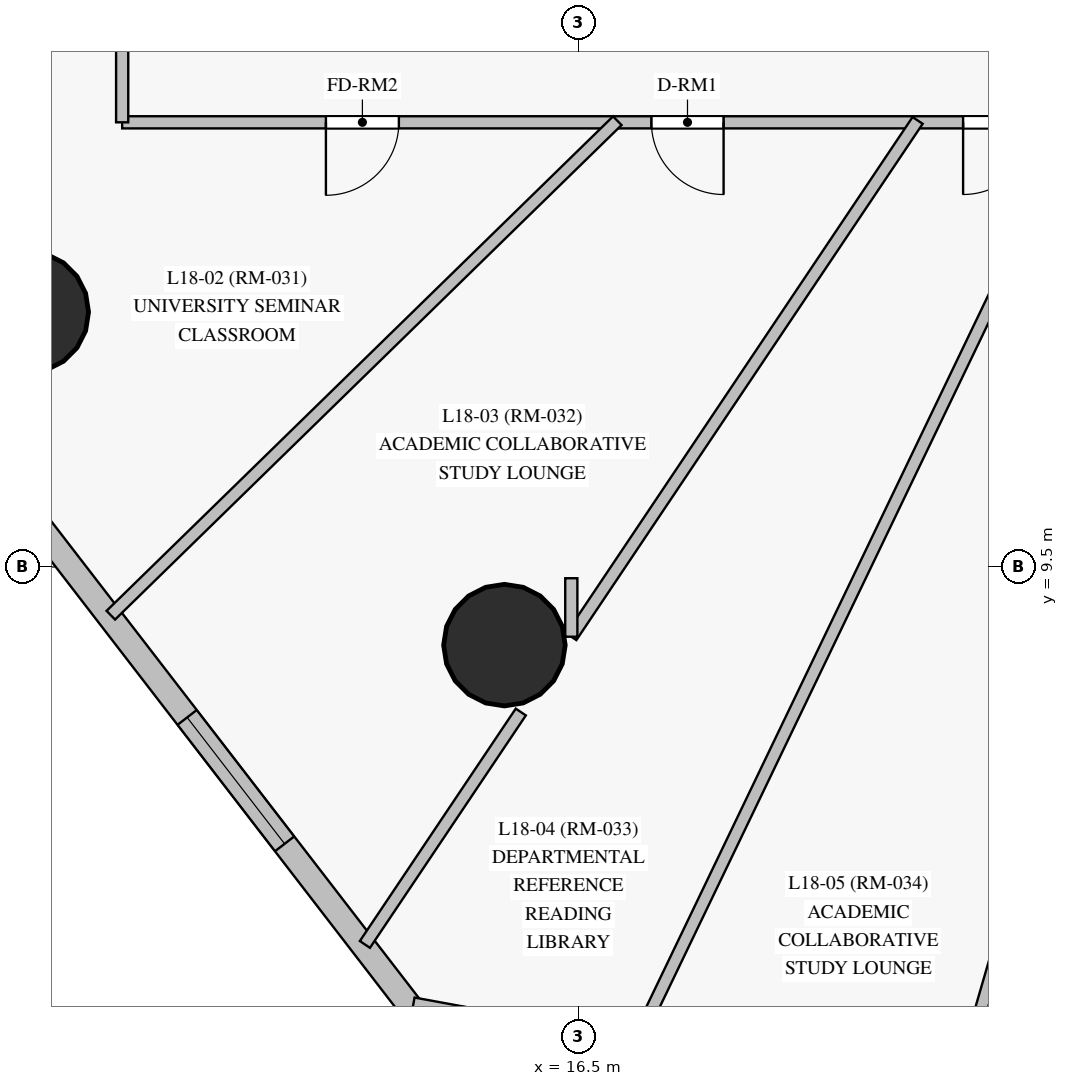
"""IFC4 building model, lengths in metres.
Left out: names, types, materials, properties, quantities, classifications, styles, units other than length and angle.
Written with IfcOpenShell. Run it as: python <this file> out.ifc"""

import sys

from ifc_helpers import new_model, si_unit, direction, frame, frame_2d, origin, origin_with_axes, origin_2d, place, context, subcontext, project, spatial, rectangle, circle, extrude, source, transform, mapped, element, fill, save


model = new_model("IFC4")
c1 = context("Model", 3, precision=1e-05, world=origin(), true_north=direction((0.0, 1.0)))
c2 = subcontext(c1, "Body", "Model", "MODEL_VIEW")
j1 = project(units=[si_unit("LENGTHUNIT", "METRE"), si_unit("PLANEANGLEUNIT", "RADIAN")], contexts=[c1])
p1 = place(None, origin())
s1 = spatial("IfcSite", under=j1, at=p1, CompositionType="ELEMENT")
p2 = place(p1, origin())
s2 = spatial("IfcBuilding", under=s1, at=p2, CompositionType="ELEMENT")
p3 = place(p2, frame((0.0, 0.0, 69.7)))
s3 = spatial("IfcBuildingStorey", under=s2, at=p3, CompositionType="ELEMENT", Elevation=69.7)
m1 = source(origin_with_axes(), c2, "Body", "SweptSolid", [
    extrude(circle(Radius=0.8, at=origin_2d()), origin(), (0.0, 0.0, 1.0), 3.6),
])
for number, where, z_axis, x_axis in (
    (1, (9.258, 12.854, 0.0), (0.0, 0.0, 1.0), (1.0, 0.0, 0.0)),
    (2, (15.529, 8.472, 0.0), (0.0, 0.0, 1.0), (1.0, 0.0, 0.0)),
):
    element("IfcColumn", number, at=place(p3, frame(where, z_axis=z_axis, x_axis=x_axis)), inside=s3, PredefinedType="COLUMN", context=c2, shape_type="MappedRepresentation", body=[
        mapped(m1, transform((0.0, 0.0, 0.0), scale=1.0)),
    ])
p4 = place(p3, frame((6.609, 13.677, 0.0), z_axis=(0.0, 0.0, 1.0), x_axis=(0.610596304002, -0.791942014001, 0.0)))
e3 = element("IfcWall", 3, at=p4, inside=s3, PredefinedType="SOLIDWALL", context=c2, shape_type="SweptSolid", body=[
    extrude(rectangle(XDim=12.625, YDim=0.32, at=frame_2d((6.312, 0.0))), origin(), (0.0, 0.0, 1.0), 3.35),
])
p5 = place(p4, frame((2.025, 0.0, 0.85)))
e4 = element("IfcOpeningElement", 4, at=p5, cuts=e3, PredefinedType="OPENING", context=c2, shape_type="SweptSolid", body=[
    extrude(rectangle(XDim=2.1, YDim=1.95, at=frame_2d((1.05, 0.975))), frame((0.0, 0.17, 0.0), z_axis=(0.0, -1.0, 0.0), x_axis=(1.0, 0.0, 0.0)), (0.0, 0.0, 1.0), 0.34),
])
p6 = place(p4, frame((7.773, 0.0, 0.85)))
e5 = element("IfcOpeningElement", 5, at=p6, cuts=e3, PredefinedType="OPENING", context=c2, shape_type="SweptSolid", body=[
    extrude(rectangle(XDim=2.1, YDim=1.95, at=frame_2d((1.05, 0.975))), frame((0.0, 0.17, 0.0), z_axis=(0.0, -1.0, 0.0), x_axis=(1.0, 0.0, 0.0)), (0.0, 0.0, 1.0), 0.34),
])
p7 = place(p3, frame((14.318, 3.678, 0.0), z_axis=(0.0, 0.0, 1.0), x_axis=(0.983594660339, -0.180392749723, 0.0)))
e6 = element("IfcWall", 6, at=p7, inside=s3, PredefinedType="SOLIDWALL", context=c2, shape_type="SweptSolid", body=[
    extrude(rectangle(XDim=10.133, YDim=0.32, at=frame_2d((5.066, 0.0))), origin(), (0.0, 0.0, 1.0), 3.35),
])
p8 = place(p7, frame((0.61, 0.0, 0.85)))
e7 = element("IfcOpeningElement", 7, at=p8, cuts=e6, PredefinedType="OPENING", context=c2, shape_type="SweptSolid", body=[
    extrude(rectangle(XDim=1.8, YDim=1.85, at=frame_2d((0.9, 0.925))), frame((0.0, 0.17, 0.0), z_axis=(0.0, -1.0, 0.0), x_axis=(1.0, 0.0, 0.0)), (0.0, 0.0, 1.0), 0.34),
])
p9 = place(p7, frame((4.044, 0.0, 0.85)))
e8 = element("IfcOpeningElement", 8, at=p9, cuts=e6, PredefinedType="OPENING", context=c2, shape_type="SweptSolid", body=[
    extrude(rectangle(XDim=2.1, YDim=1.95, at=frame_2d((1.05, 0.975))), frame((0.0, 0.17, 0.0), z_axis=(0.0, -1.0, 0.0), x_axis=(1.0, 0.0, 0.0)), (0.0, 0.0, 1.0), 0.34),
])
p10 = place(p3, frame((40.25, 15.35, 0.0), z_axis=(0.0, 0.0, 1.0), x_axis=(-1.0, 0.0, 0.0)))
e9 = element("IfcWall", 9, at=p10, inside=s3, PredefinedType="PARTITIONING", context=c2, shape_type="SweptSolid", body=[
    extrude(rectangle(XDim=29.75, YDim=0.16, at=frame_2d((14.875, 0.0))), origin(), (0.0, 0.0, 1.0), 2.7),
])
p11 = place(p10, frame((26.11, 0.0, 0.0)))
e10 = element("IfcOpeningElement", 10, at=p11, cuts=e9, PredefinedType="OPENING", context=c2, shape_type="SweptSolid", body=[
    extrude(rectangle(XDim=0.96, YDim=2.15, at=frame_2d((0.48, 1.075))), frame((0.0, 0.09, 0.0), z_axis=(0.0, -1.0, 0.0), x_axis=(1.0, 0.0, 0.0)), (0.0, 0.0, 1.0), 0.18),
])
p12 = place(p10, frame((21.837, 0.0, 0.0)))
e11 = element("IfcOpeningElement", 11, at=p12, cuts=e9, PredefinedType="OPENING", context=c2, shape_type="SweptSolid", body=[
    extrude(rectangle(XDim=0.95, YDim=2.15, at=frame_2d((0.475, 1.075))), frame((0.0, 0.09, 0.0), z_axis=(0.0, -1.0, 0.0), x_axis=(1.0, 0.0, 0.0)), (0.0, 0.0, 1.0), 0.18),
])
p13 = place(p10, frame((17.737, 0.0, 0.0)))
e12 = element("IfcOpeningElement", 12, at=p13, cuts=e9, PredefinedType="OPENING", context=c2, shape_type="SweptSolid", body=[
    extrude(rectangle(XDim=0.95, YDim=2.15, at=frame_2d((0.475, 1.075))), frame((0.0, 0.09, 0.0), z_axis=(0.0, -1.0, 0.0), x_axis=(1.0, 0.0, 0.0)), (0.0, 0.0, 1.0), 0.18),
])
p14 = place(p10, frame((15.604, 0.0, 0.0)))
e13 = element("IfcOpeningElement", 13, at=p14, cuts=e9, PredefinedType="OPENING", context=c2, shape_type="SweptSolid", body=[
    extrude(rectangle(XDim=0.95, YDim=2.15, at=frame_2d((0.475, 1.075))), frame((0.0, 0.09, 0.0), z_axis=(0.0, -1.0, 0.0), x_axis=(1.0, 0.0, 0.0)), (0.0, 0.0, 1.0), 0.18),
])
p15 = place(p10, frame((12.96, 0.0, 0.0)))
e14 = element("IfcOpeningElement", 14, at=p15, cuts=e9, PredefinedType="OPENING", context=c2, shape_type="SweptSolid", body=[
    extrude(rectangle(XDim=0.96, YDim=2.15, at=frame_2d((0.48, 1.075))), frame((0.0, 0.09, 0.0), z_axis=(0.0, -1.0, 0.0), x_axis=(1.0, 0.0, 0.0)), (0.0, 0.0, 1.0), 0.18),
])
p16 = place(p10, frame((11.281, 0.0, 0.0)))
e15 = element("IfcOpeningElement", 15, at=p16, cuts=e9, PredefinedType="OPENING", context=c2, shape_type="SweptSolid", body=[
    extrude(rectangle(XDim=0.95, YDim=2.15, at=frame_2d((0.475, 1.075))), frame((0.0, 0.09, 0.0), z_axis=(0.0, -1.0, 0.0), x_axis=(1.0, 0.0, 0.0)), (0.0, 0.0, 1.0), 0.18),
])
p17 = place(p10, frame((9.601, 0.0, 0.0)))
e16 = element("IfcOpeningElement", 16, at=p17, cuts=e9, PredefinedType="OPENING", context=c2, shape_type="SweptSolid", body=[
    extrude(rectangle(XDim=0.96, YDim=2.15, at=frame_2d((0.48, 1.075))), frame((0.0, 0.09, 0.0), z_axis=(0.0, -1.0, 0.0), x_axis=(1.0, 0.0, 0.0)), (0.0, 0.0, 1.0), 0.18),
])
p18 = place(p10, frame((8.498, 0.0, 0.0)))
e17 = element("IfcOpeningElement", 17, at=p18, cuts=e9, PredefinedType="OPENING", context=c2, shape_type="SweptSolid", body=[
    extrude(rectangle(XDim=0.95, YDim=2.15, at=frame_2d((0.475, 1.075))), frame((0.0, 0.09, 0.0), z_axis=(0.0, -1.0, 0.0), x_axis=(1.0, 0.0, 0.0)), (0.0, 0.0, 1.0), 0.18),
])
p19 = place(p10, frame((2.579, 0.0, 0.0)))
e18 = element("IfcOpeningElement", 18, at=p19, cuts=e9, PredefinedType="OPENING", context=c2, shape_type="SweptSolid", body=[
    extrude(rectangle(XDim=0.95, YDim=2.15, at=frame_2d((0.475, 1.075))), frame((0.0, 0.09, 0.0), z_axis=(0.0, -1.0, 0.0), x_axis=(1.0, 0.0, 0.0)), (0.0, 0.0, 1.0), 0.18),
])
p20 = place(p3, frame((10.5, 15.35, 0.0), z_axis=(0.0, 0.0, 1.0), x_axis=(0.0, 1.0, 0.0)))
e19 = element("IfcWall", 19, at=p20, inside=s3, PredefinedType="PARTITIONING", context=c2, shape_type="SweptSolid", body=[
    extrude(rectangle(XDim=22.3, YDim=0.16, at=frame_2d((11.15, 0.0))), origin(), (0.0, 0.0, 1.0), 2.75),
])
p21 = place(p20, frame((7.33, 0.0, 0.0)))
e20 = element("IfcOpeningElement", 20, at=p21, cuts=e19, PredefinedType="OPENING", context=c2, shape_type="SweptSolid", body=[
    extrude(rectangle(XDim=0.95, YDim=2.15, at=frame_2d((0.475, 1.075))), frame((0.0, 0.09, 0.0), z_axis=(0.0, -1.0, 0.0), x_axis=(1.0, 0.0, 0.0)), (0.0, 0.0, 1.0), 0.18),
])
p22 = place(p20, frame((16.25, 0.0, 0.0)))
e21 = element("IfcOpeningElement", 21, at=p22, cuts=e19, PredefinedType="OPENING", context=c2, shape_type="SweptSolid", body=[
    extrude(rectangle(XDim=0.96, YDim=2.15, at=frame_2d((0.48, 1.075))), frame((0.0, 0.09, 0.0), z_axis=(0.0, -1.0, 0.0), x_axis=(1.0, 0.0, 0.0)), (0.0, 0.0, 1.0), 0.18),
])
p23 = place(p20, frame((10.675, 0.0, 0.0)))
e22 = element("IfcOpeningElement", 22, at=p23, cuts=e19, PredefinedType="OPENING", context=c2, shape_type="SweptSolid", body=[
    extrude(rectangle(XDim=0.95, YDim=2.15, at=frame_2d((0.475, 1.075))), frame((0.0, 0.09, 0.0), z_axis=(0.0, -1.0, 0.0), x_axis=(1.0, 0.0, 0.0)), (0.0, 0.0, 1.0), 0.18),
])
p24 = place(p3, frame((23.096, 15.39, 0.0), z_axis=(0.0, 0.0, 1.0), x_axis=(-0.433095236194, -0.901348166019, 0.0)))
e23 = element("IfcWall", 23, at=p24, inside=s3, PredefinedType="PARTITIONING", context=c2, shape_type="SweptSolid", body=[
    extrude(rectangle(XDim=13.555, YDim=0.16, at=frame_2d((6.777, 0.0))), origin(), (0.0, 0.0, 1.0), 3.35),
])
p25 = place(p3, frame((25.203, 15.379, 0.0), z_axis=(0.0, 0.0, 1.0), x_axis=(-0.279252938463, -0.960217577615, 0.0)))
e24 = element("IfcWall", 24, at=p25, inside=s3, PredefinedType="PARTITIONING", context=c2, shape_type="SweptSolid", body=[
    extrude(rectangle(XDim=13.517, YDim=0.16, at=frame_2d((6.759, 0.0))), origin(), (0.0, 0.0, 1.0), 3.35),
])
p26 = place(p3, frame((17.014, 15.371, 0.0), z_axis=(0.0, 0.0, 1.0), x_axis=(-0.715549557625, -0.69856197333, 0.0)))
e25 = element("IfcWall", 25, at=p26, inside=s3, PredefinedType="PARTITIONING", context=c2, shape_type="SweptSolid", body=[
    extrude(rectangle(XDim=9.313, YDim=0.16, at=frame_2d((4.656, 0.0))), origin(), (0.0, 0.0, 1.0), 3.35),
])
p27 = place(p3, frame((20.965, 15.375, 0.0), z_axis=(0.0, 0.0, 1.0), x_axis=(-0.557067606791, -0.830467146529, 0.0)))
e26 = element("IfcWall", 26, at=p27, inside=s3, PredefinedType="PARTITIONING", context=c2, shape_type="SweptSolid", body=[
    extrude(rectangle(XDim=8.179, YDim=0.16, at=frame_2d((4.089, 0.0))), origin(), (0.0, 0.0, 1.0), 3.35),
])
p28 = place(p3, frame((10.54, 17.587, 0.0), z_axis=(0.0, 0.0, 1.0), x_axis=(-0.894427191, -0.4472135955, 0.0)))
e27 = element("IfcWall", 27, at=p28, inside=s3, PredefinedType="PARTITIONING", context=c2, shape_type="SweptSolid", body=[
    extrude(rectangle(XDim=4.659, YDim=0.16, at=frame_2d((2.33, 0.0))), origin(), (0.0, 0.0, 1.0), 3.35),
])
p29 = place(p3, frame((15.744, 7.592, 0.0), z_axis=(0.0, 0.0, 1.0), x_axis=(-0.55699338803, -0.830516926794, 0.0)))
e28 = element("IfcWall", 28, at=p29, inside=s3, PredefinedType="PARTITIONING", context=c2, shape_type="SweptSolid", body=[
    extrude(rectangle(XDim=3.682, YDim=0.16, at=frame_2d((1.841, 0.0))), origin(), (0.0, 0.0, 1.0), 3.35),
])
p30 = place(p3, frame((16.409, 8.583, 0.0), z_axis=(0.0, 0.0, 1.0), x_axis=(0.0, 1.0, 0.0)))
e29 = element("IfcWall", 29, at=p30, inside=s3, PredefinedType="PARTITIONING", context=c2, shape_type="SweptSolid", body=[
    extrude(rectangle(XDim=0.769, YDim=0.16, at=frame_2d((0.385, 0.0))), origin(), (0.0, 0.0, 1.0), 2.7),
])
m2 = source(origin_with_axes(), c2, "Body", "SweptSolid", [
    extrude(rectangle(XDim=2.1, YDim=1.95, at=frame_2d((1.05, 0.975))), frame((0.0, 0.03, 0.0), z_axis=(0.0, -1.0, 0.0), x_axis=(1.0, 0.0, 0.0)), (0.0, 0.0, 1.0), 0.06),
])
p31 = place(p6, origin())
e30 = element("IfcWindow", 30, at=p31, inside=s3, PartitioningType="SINGLE_PANEL", PredefinedType="WINDOW", context=c2, shape_type="MappedRepresentation", body=[
    mapped(m2, transform((0.0, 0.0, 0.0), scale=1.0)),
])
fill(e5, e30)
m3 = source(origin_with_axes(), c2, "Body", "SweptSolid", [
    extrude(rectangle(XDim=0.96, YDim=2.15, at=frame_2d((0.48, 1.075))), frame((0.0, 0.025, 0.0), z_axis=(0.0, -1.0, 0.0), x_axis=(1.0, 0.0, 0.0)), (0.0, 0.0, 1.0), 0.05),
])
p32 = place(p11, origin())
e31 = element("IfcDoor", 31, at=p32, inside=s3, OperationType="SINGLE_SWING_RIGHT", PredefinedType="DOOR", context=c2, shape_type="MappedRepresentation", body=[
    mapped(m3, transform((0.0, 0.0, 0.0), scale=1.0)),
])
fill(e10, e31)
m4 = source(origin_with_axes(), c2, "Body", "SweptSolid", [
    extrude(rectangle(XDim=0.95, YDim=2.15, at=frame_2d((0.475, 1.075))), frame((0.0, 0.025, 0.0), z_axis=(0.0, -1.0, 0.0), x_axis=(1.0, 0.0, 0.0)), (0.0, 0.0, 1.0), 0.05),
])
p33 = place(p12, origin())
e32 = element("IfcDoor", 32, at=p33, inside=s3, OperationType="SINGLE_SWING_LEFT", PredefinedType="DOOR", context=c2, shape_type="MappedRepresentation", body=[
    mapped(m4, transform((0.0, 0.0, 0.0), scale=1.0)),
])
fill(e11, e32)
p34 = place(p13, origin())
e33 = element("IfcDoor", 33, at=p34, inside=s3, OperationType="SINGLE_SWING_RIGHT", PredefinedType="DOOR", context=c2, shape_type="MappedRepresentation", body=[
    mapped(m4, transform((0.0, 0.0, 0.0), scale=1.0)),
])
fill(e12, e33)
save(model, sys.argv[1])
